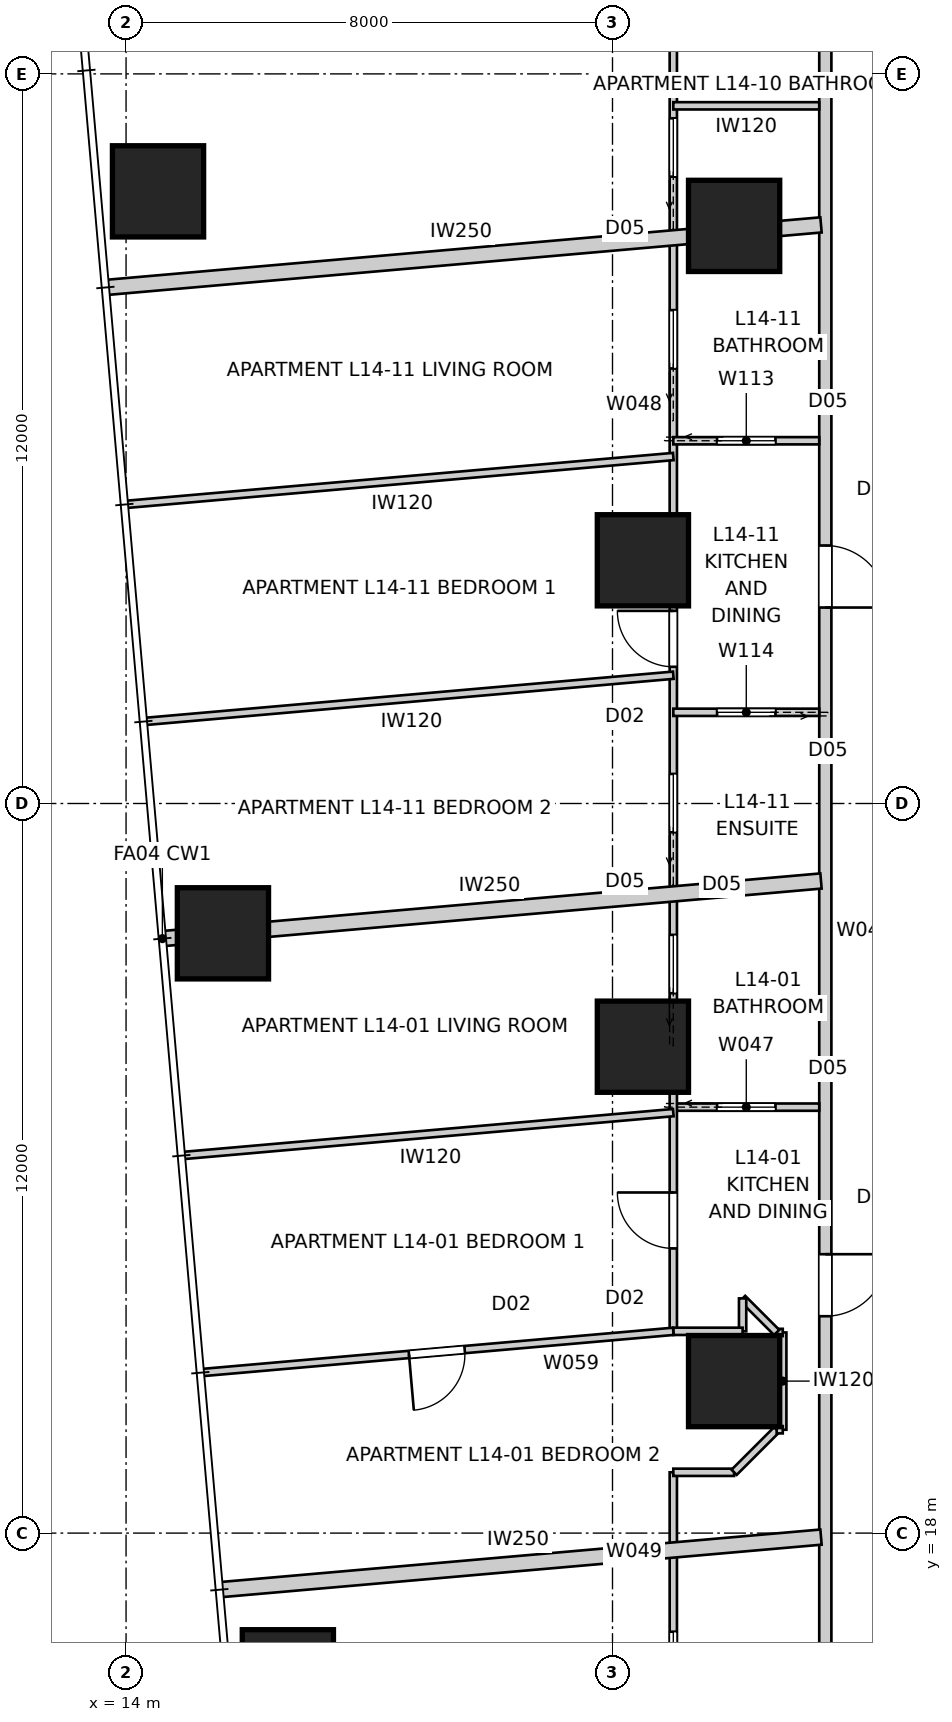
"""IFC4 building model, lengths in metres.
Left out: names, types, materials, properties, quantities, classifications, styles, units other than length and angle.
Written with IfcOpenShell. Run it as: python <this file> out.ifc"""

import sys

from ifc_helpers import new_model, si_unit, direction, frame, frame_2d, origin, origin_2d, place, context, subcontext, project, spatial, rectangle, extrude, element, fill, save


model = new_model("IFC4")
c1 = context("Model", 3, precision=1e-05, world=origin(), true_north=direction((0.0, 1.0)))
c2 = subcontext(c1, "Body", "Model", "MODEL_VIEW")
j1 = project(units=[si_unit("LENGTHUNIT", "METRE"), si_unit("PLANEANGLEUNIT", "RADIAN")], contexts=[c1])
p1 = place(None, origin())
s1 = spatial("IfcSite", under=j1, at=p1, CompositionType="ELEMENT")
p2 = place(p1, origin())
s2 = spatial("IfcBuilding", under=s1, at=p2, CompositionType="ELEMENT")
p3 = place(p2, frame((0.0, 0.0, 54.0)))
s3 = spatial("IfcBuildingStorey", under=s2, at=p3, CompositionType="ELEMENT", Elevation=54.0)
for number, where, z_axis, x_axis in (
    (1, (14.526, 40.068, 0.0), (0.0, 0.0, 1.0), (1.0, 0.0, 0.0)),
    (2, (15.593, 27.865, 0.0), (0.0, 0.0, 1.0), (1.0, 0.0, 0.0)),
    (3, (16.661, 15.661, 0.0), (0.0, 0.0, 1.0), (1.0, 0.0, 0.0)),
    (4, (24.0, 39.5, 0.0), (0.0, 0.0, 1.0), (1.0, 0.0, 0.0)),
    (5, (22.5, 34.0, 0.0), (0.0, 0.0, 1.0), (1.0, 0.0, 0.0)),
    (6, (22.5, 26.0, 0.0), (0.0, 0.0, 1.0), (1.0, 0.0, 0.0)),
    (7, (24.0, 20.5, 0.0), (0.0, 0.0, 1.0), (1.0, 0.0, 0.0)),
):
    element("IfcColumn", number, at=place(p3, frame(where, z_axis=z_axis, x_axis=x_axis)), inside=s3, PredefinedType="COLUMN", context=c2, shape_type="SweptSolid", body=[
        extrude(rectangle(XDim=1.5, YDim=1.5, at=origin_2d()), origin(), (0.0, 0.0, 1.0), 3.4),
    ])
p4 = place(p3, frame((25.5, 43.7, 0.0), z_axis=(0.0, 0.0, 1.0), x_axis=(0.0, -1.0, 0.0)))
e8 = element("IfcWall", 8, at=p4, inside=s3, PredefinedType="PARTITIONING", context=c2, shape_type="SweptSolid", body=[
    extrude(rectangle(XDim=28.2, YDim=0.2, at=frame_2d((14.1, 0.0))), origin(), (0.0, 0.0, 1.0), 3.25),
])
p5 = place(p4, frame((21.113, 0.0, 0.0)))
e9 = element("IfcOpeningElement", 9, at=p5, cuts=e8, PredefinedType="OPENING", context=c2, shape_type="SweptSolid", body=[
    extrude(rectangle(XDim=1.02, YDim=2.34, at=frame_2d((0.51, 1.17))), frame((0.0, 0.11, 0.0), z_axis=(0.0, -1.0, 0.0), x_axis=(1.0, 0.0, 0.0)), (0.0, 0.0, 1.0), 0.22),
])
p6 = place(p4, frame((9.457, 0.0, 0.0)))
e10 = element("IfcOpeningElement", 10, at=p6, cuts=e8, PredefinedType="OPENING", context=c2, shape_type="SweptSolid", body=[
    extrude(rectangle(XDim=1.02, YDim=2.34, at=frame_2d((0.51, 1.17))), frame((0.0, 0.11, 0.0), z_axis=(0.0, -1.0, 0.0), x_axis=(1.0, 0.0, 0.0)), (0.0, 0.0, 1.0), 0.22),
])
p7 = place(p3, frame((13.66, 38.487, 0.0), z_axis=(0.0, 0.0, 1.0), x_axis=(0.996193605338, 0.087168232078, 0.0)))
e11 = element("IfcWall", 11, at=p7, inside=s3, PredefinedType="PARTITIONING", context=c2, shape_type="SweptSolid", body=[
    extrude(rectangle(XDim=11.814, YDim=0.25, at=frame_2d((5.907, 0.0))), origin(), (0.0, 0.0, 1.0), 3.25),
])
p8 = place(p3, frame((15.534, 17.068, 0.0), z_axis=(0.0, 0.0, 1.0), x_axis=(0.996194517831, 0.087157803114, 0.0)))
e12 = element("IfcWall", 12, at=p8, inside=s3, PredefinedType="PARTITIONING", context=c2, shape_type="SweptSolid", body=[
    extrude(rectangle(XDim=9.933, YDim=0.25, at=frame_2d((4.966, 0.0))), origin(), (0.0, 0.0, 1.0), 3.25),
])
p9 = place(p3, frame((14.597, 27.778, 0.0), z_axis=(0.0, 0.0, 1.0), x_axis=(0.996196056792, 0.087140211333, 0.0)))
e13 = element("IfcWall", 13, at=p9, inside=s3, PredefinedType="PARTITIONING", context=c2, shape_type="SweptSolid", body=[
    extrude(rectangle(XDim=10.873, YDim=0.25, at=frame_2d((5.437, 0.0))), origin(), (0.0, 0.0, 1.0), 3.25),
])
p10 = place(p3, frame((23.0, 25.006, 0.0), z_axis=(0.0, 0.0, 1.0), x_axis=(1.0, 0.0, 0.0)))
e14 = element("IfcWall", 14, at=p10, inside=s3, PredefinedType="PARTITIONING", context=c2, shape_type="SweptSolid", body=[
    extrude(rectangle(XDim=2.4, YDim=0.12, at=frame_2d((1.2, 0.0))), origin(), (0.0, 0.0, 1.0), 3.25),
])
p11 = place(p10, frame((0.72, 0.0, 0.0)))
e15 = element("IfcOpeningElement", 15, at=p11, cuts=e14, PredefinedType="OPENING", context=c2, shape_type="SweptSolid", body=[
    extrude(rectangle(XDim=0.96, YDim=2.1, at=frame_2d((0.48, 1.05))), frame((0.0, 0.07, 0.0), z_axis=(0.0, -1.0, 0.0), x_axis=(1.0, 0.0, 0.0)), (0.0, 0.0, 1.0), 0.14),
])
p12 = place(p3, frame((23.0, 21.319, 0.0), z_axis=(0.0, 0.0, 1.0), x_axis=(0.0, 1.0, 0.0)))
e16 = element("IfcWall", 16, at=p12, inside=s3, PredefinedType="PARTITIONING", context=c2, shape_type="SweptSolid", body=[
    extrude(rectangle(XDim=25.681, YDim=0.12, at=frame_2d((12.841, 0.0))), origin(), (0.0, 0.0, 1.0), 2.55),
])
p13 = place(p12, frame((1.364, 0.0, 0.0)))
e17 = element("IfcOpeningElement", 17, at=p13, cuts=e16, PredefinedType="OPENING", context=c2, shape_type="SweptSolid", body=[
    extrude(rectangle(XDim=0.92, YDim=2.34, at=frame_2d((0.46, 1.17))), frame((0.0, 0.07, 0.0), z_axis=(0.0, -1.0, 0.0), x_axis=(1.0, 0.0, 0.0)), (0.0, 0.0, 1.0), 0.14),
])
p14 = place(p12, frame((10.93, 0.0, 0.0)))
e18 = element("IfcOpeningElement", 18, at=p14, cuts=e16, PredefinedType="OPENING", context=c2, shape_type="SweptSolid", body=[
    extrude(rectangle(XDim=0.92, YDim=2.34, at=frame_2d((0.46, 1.17))), frame((0.0, 0.07, 0.0), z_axis=(0.0, -1.0, 0.0), x_axis=(1.0, 0.0, 0.0)), (0.0, 0.0, 1.0), 0.14),
])
p15 = place(p12, frame((22.233, 0.0, 0.0)))
e19 = element("IfcOpeningElement", 19, at=p15, cuts=e16, PredefinedType="OPENING", context=c2, shape_type="SweptSolid", body=[
    extrude(rectangle(XDim=0.92, YDim=2.34, at=frame_2d((0.46, 1.17))), frame((0.0, 0.07, 0.0), z_axis=(0.0, -1.0, 0.0), x_axis=(1.0, 0.0, 0.0)), (0.0, 0.0, 1.0), 0.14),
])
p16 = place(p12, frame((18.991, 0.0, 0.0)))
e20 = element("IfcOpeningElement", 20, at=p16, cuts=e16, PredefinedType="OPENING", context=c2, shape_type="SweptSolid", body=[
    extrude(rectangle(XDim=0.96, YDim=2.1, at=frame_2d((0.48, 1.05))), frame((0.0, 0.07, 0.0), z_axis=(0.0, -1.0, 0.0), x_axis=(1.0, 0.0, 0.0)), (0.0, 0.0, 1.0), 0.14),
])
p17 = place(p12, frame((5.561, 0.0, 0.0)))
e21 = element("IfcOpeningElement", 21, at=p17, cuts=e16, PredefinedType="OPENING", context=c2, shape_type="SweptSolid", body=[
    extrude(rectangle(XDim=0.96, YDim=2.1, at=frame_2d((0.48, 1.05))), frame((0.0, 0.07, 0.0), z_axis=(0.0, -1.0, 0.0), x_axis=(1.0, 0.0, 0.0)), (0.0, 0.0, 1.0), 0.14),
])
p18 = place(p12, frame((15.836, 0.0, 0.0)))
e22 = element("IfcOpeningElement", 22, at=p18, cuts=e16, PredefinedType="OPENING", context=c2, shape_type="SweptSolid", body=[
    extrude(rectangle(XDim=0.96, YDim=2.1, at=frame_2d((0.48, 1.05))), frame((0.0, 0.07, 0.0), z_axis=(0.0, -1.0, 0.0), x_axis=(1.0, 0.0, 0.0)), (0.0, 0.0, 1.0), 0.14),
])
p19 = place(p12, frame((8.208, 0.0, 0.0)))
e23 = element("IfcOpeningElement", 23, at=p19, cuts=e16, PredefinedType="OPENING", context=c2, shape_type="SweptSolid", body=[
    extrude(rectangle(XDim=0.96, YDim=2.1, at=frame_2d((0.48, 1.05))), frame((0.0, 0.07, 0.0), z_axis=(0.0, -1.0, 0.0), x_axis=(1.0, 0.0, 0.0)), (0.0, 0.0, 1.0), 0.14),
])
p20 = place(p3, frame((23.0, 13.0, 0.0), z_axis=(0.0, 0.0, 1.0), x_axis=(0.0, 1.0, 0.0)))
e24 = element("IfcWall", 24, at=p20, inside=s3, PredefinedType="PARTITIONING", context=c2, shape_type="SweptSolid", body=[
    extrude(rectangle(XDim=6.0, YDim=0.12, at=frame_2d((3.0, 0.0))), origin(), (0.0, 0.0, 1.0), 3.25),
])
p21 = place(p20, frame((2.418, 0.0, 0.0)))
e25 = element("IfcOpeningElement", 25, at=p21, cuts=e24, PredefinedType="OPENING", context=c2, shape_type="SweptSolid", body=[
    extrude(rectangle(XDim=0.96, YDim=2.1, at=frame_2d((0.48, 1.05))), frame((0.0, 0.07, 0.0), z_axis=(0.0, -1.0, 0.0), x_axis=(1.0, 0.0, 0.0)), (0.0, 0.0, 1.0), 0.14),
])
p22 = place(p3, frame((23.0, 19.0, 0.0), z_axis=(0.0, 0.0, 1.0), x_axis=(1.0, 0.0, 0.0)))
e26 = element("IfcWall", 26, at=p22, inside=s3, PredefinedType="PARTITIONING", context=c2, shape_type="SweptSolid", body=[
    extrude(rectangle(XDim=1.0, YDim=0.12, at=frame_2d((0.5, 0.0))), origin(), (0.0, 0.0, 1.0), 3.25),
])
p23 = place(p3, frame((24.0, 19.0, 0.0), z_axis=(0.0, 0.0, 1.0), x_axis=(0.707106781187, 0.707106781187, 0.0)))
e27 = element("IfcWall", 27, at=p23, inside=s3, PredefinedType="PARTITIONING", context=c2, shape_type="SweptSolid", body=[
    extrude(rectangle(XDim=0.99, YDim=0.12, at=frame_2d((0.495, 0.0))), origin(), (0.0, 0.0, 1.0), 3.25),
])
p24 = place(p3, frame((24.8, 19.7, 0.0), z_axis=(0.0, 0.0, 1.0), x_axis=(0.0, 1.0, 0.0)))
e28 = element("IfcWall", 28, at=p24, inside=s3, PredefinedType="PARTITIONING", context=c2, shape_type="SweptSolid", body=[
    extrude(rectangle(XDim=1.6, YDim=0.12, at=frame_2d((0.8, 0.0))), origin(), (0.0, 0.0, 1.0), 3.25),
])
p25 = place(p3, frame((24.7, 21.3, 0.0), z_axis=(0.0, 0.0, 1.0), x_axis=(-0.707106781187, 0.707106781187, 0.0)))
e29 = element("IfcWall", 29, at=p25, inside=s3, PredefinedType="PARTITIONING", context=c2, shape_type="SweptSolid", body=[
    extrude(rectangle(XDim=0.792, YDim=0.12, at=frame_2d((0.396, 0.0))), origin(), (0.0, 0.0, 1.0), 3.25),
])
p26 = place(p3, frame((24.14, 21.86, 0.0), z_axis=(0.0, 0.0, 1.0), x_axis=(0.0, -1.0, 0.0)))
e30 = element("IfcWall", 30, at=p26, inside=s3, PredefinedType="PARTITIONING", context=c2, shape_type="SweptSolid", body=[
    extrude(rectangle(XDim=0.542, YDim=0.12, at=frame_2d((0.271, 0.0))), origin(), (0.0, 0.0, 1.0), 3.25),
])
p27 = place(p3, frame((24.14, 21.319, 0.0), z_axis=(0.0, 0.0, 1.0), x_axis=(-1.0, 0.0, 0.0)))
e31 = element("IfcWall", 31, at=p27, inside=s3, PredefinedType="PARTITIONING", context=c2, shape_type="SweptSolid", body=[
    extrude(rectangle(XDim=1.14, YDim=0.12, at=frame_2d((0.57, 0.0))), origin(), (0.0, 0.0, 1.0), 3.25),
])
p28 = place(p3, frame((23.0, 24.916, 0.0), z_axis=(0.0, 0.0, 1.0), x_axis=(-0.99619214338, -0.087184938313, 0.0)))
e32 = element("IfcWall", 32, at=p28, inside=s3, PredefinedType="PARTITIONING", context=c2, shape_type="SweptSolid", body=[
    extrude(rectangle(XDim=8.082, YDim=0.12, at=frame_2d((4.041, 0.0))), origin(), (0.0, 0.0, 1.0), 3.25),
])
p29 = place(p3, frame((23.0, 21.319, 0.0), z_axis=(0.0, 0.0, 1.0), x_axis=(-0.996195047824, -0.0871517452, 0.0)))
e33 = element("IfcWall", 33, at=p29, inside=s3, PredefinedType="PARTITIONING", context=c2, shape_type="SweptSolid", body=[
    extrude(rectangle(XDim=7.768, YDim=0.12, at=frame_2d((3.884, 0.0))), origin(), (0.0, 0.0, 1.0), 3.25),
])
p30 = place(p29, frame((3.444, 0.0, 0.0)))
e34 = element("IfcOpeningElement", 34, at=p30, cuts=e33, PredefinedType="OPENING", context=c2, shape_type="SweptSolid", body=[
    extrude(rectangle(XDim=0.92, YDim=2.34, at=frame_2d((0.46, 1.17))), frame((0.0, 0.07, 0.0), z_axis=(0.0, -1.0, 0.0), x_axis=(1.0, 0.0, 0.0)), (0.0, 0.0, 1.0), 0.14),
])
p31 = place(p3, frame((25.4, 41.475, 0.0), z_axis=(0.0, 0.0, 1.0), x_axis=(-1.0, 0.0, 0.0)))
e35 = element("IfcWall", 35, at=p31, inside=s3, PredefinedType="PARTITIONING", context=c2, shape_type="SweptSolid", body=[
    extrude(rectangle(XDim=2.4, YDim=0.12, at=frame_2d((1.2, 0.0))), origin(), (0.0, 0.0, 1.0), 3.25),
])
p32 = place(p3, frame((23.0, 35.966, 0.0), z_axis=(0.0, 0.0, 1.0), x_axis=(1.0, 0.0, 0.0)))
e36 = element("IfcWall", 36, at=p32, inside=s3, PredefinedType="PARTITIONING", context=c2, shape_type="SweptSolid", body=[
    extrude(rectangle(XDim=2.4, YDim=0.12, at=frame_2d((1.2, 0.0))), origin(), (0.0, 0.0, 1.0), 3.25),
])
p33 = place(p32, frame((0.72, 0.0, 0.0)))
e37 = element("IfcOpeningElement", 37, at=p33, cuts=e36, PredefinedType="OPENING", context=c2, shape_type="SweptSolid", body=[
    extrude(rectangle(XDim=0.96, YDim=2.1, at=frame_2d((0.48, 1.05))), frame((0.0, 0.07, 0.0), z_axis=(0.0, -1.0, 0.0), x_axis=(1.0, 0.0, 0.0)), (0.0, 0.0, 1.0), 0.14),
])
p34 = place(p3, frame((25.4, 31.5, 0.0), z_axis=(0.0, 0.0, 1.0), x_axis=(-1.0, 0.0, 0.0)))
e38 = element("IfcWall", 38, at=p34, inside=s3, PredefinedType="PARTITIONING", context=c2, shape_type="SweptSolid", body=[
    extrude(rectangle(XDim=2.4, YDim=0.12, at=frame_2d((1.2, 0.0))), origin(), (0.0, 0.0, 1.0), 3.25),
])
p35 = place(p34, frame((0.72, 0.0, 0.0)))
e39 = element("IfcOpeningElement", 39, at=p35, cuts=e38, PredefinedType="OPENING", context=c2, shape_type="SweptSolid", body=[
    extrude(rectangle(XDim=0.96, YDim=2.1, at=frame_2d((0.48, 1.05))), frame((0.0, 0.07, 0.0), z_axis=(0.0, -1.0, 0.0), x_axis=(1.0, 0.0, 0.0)), (0.0, 0.0, 1.0), 0.14),
])
p36 = place(p3, frame((23.0, 35.707, 0.0), z_axis=(0.0, 0.0, 1.0), x_axis=(-0.996194246178, -0.087160907995, 0.0)))
e40 = element("IfcWall", 40, at=p36, inside=s3, PredefinedType="PARTITIONING", context=c2, shape_type="SweptSolid", body=[
    extrude(rectangle(XDim=9.022, YDim=0.12, at=frame_2d((4.511, 0.0))), origin(), (0.0, 0.0, 1.0), 3.25),
])
p37 = place(p3, frame((23.0, 32.11, 0.0), z_axis=(0.0, 0.0, 1.0), x_axis=(-0.996194478193, -0.087158256162, 0.0)))
e41 = element("IfcWall", 41, at=p37, inside=s3, PredefinedType="PARTITIONING", context=c2, shape_type="SweptSolid", body=[
    extrude(rectangle(XDim=8.709, YDim=0.12, at=frame_2d((4.354, 0.0))), origin(), (0.0, 0.0, 1.0), 3.25),
])
for number, where, z_axis, x_axis in (
    (42, (24.8, 19.7, 0.0), (0.0, 0.0, 1.0), (-1.0, 0.0, 0.0)),
    (43, (24.8, 21.3, 0.0), (0.0, 0.0, 1.0), (-1.0, 0.0, 0.0)),
):
    element("IfcWall", number, at=place(p3, frame(where, z_axis=z_axis, x_axis=x_axis)), inside=s3, PredefinedType="PARTITIONING", context=c2, shape_type="SweptSolid", body=[
        extrude(rectangle(XDim=0.1, YDim=0.12, at=frame_2d((0.05, 0.0))), origin(), (0.0, 0.0, 1.0), 3.25),
    ])
p38 = place(p5, origin())
e44 = element("IfcDoor", 44, at=p38, inside=s3, OperationType="SINGLE_SWING_LEFT", PredefinedType="DOOR", context=c2, shape_type="SweptSolid", body=[
    extrude(rectangle(XDim=1.02, YDim=2.34, at=frame_2d((0.51, 1.17))), frame((0.0, 0.025, 0.0), z_axis=(0.0, -1.0, 0.0), x_axis=(1.0, 0.0, 0.0)), (0.0, 0.0, 1.0), 0.05),
])
fill(e9, e44)
p39 = place(p6, origin())
e45 = element("IfcDoor", 45, at=p39, inside=s3, OperationType="SINGLE_SWING_RIGHT", PredefinedType="DOOR", context=c2, shape_type="SweptSolid", body=[
    extrude(rectangle(XDim=1.02, YDim=2.34, at=frame_2d((0.51, 1.17))), frame((0.0, 0.025, 0.0), z_axis=(0.0, -1.0, 0.0), x_axis=(1.0, 0.0, 0.0)), (0.0, 0.0, 1.0), 0.05),
])
fill(e10, e45)
p40 = place(p13, origin())
e46 = element("IfcDoor", 46, at=p40, inside=s3, OperationType="SINGLE_SWING_RIGHT", PredefinedType="DOOR", context=c2, shape_type="SweptSolid", body=[
    extrude(rectangle(XDim=0.92, YDim=2.34, at=frame_2d((0.46, 1.17))), frame((0.0, 0.025, 0.0), z_axis=(0.0, -1.0, 0.0), x_axis=(1.0, 0.0, 0.0)), (0.0, 0.0, 1.0), 0.05),
])
fill(e17, e46)
p41 = place(p11, origin())
e47 = element("IfcDoor", 47, at=p41, inside=s3, OperationType="SLIDING_TO_LEFT", PredefinedType="DOOR", context=c2, shape_type="SweptSolid", body=[
    extrude(rectangle(XDim=0.96, YDim=2.1, at=frame_2d((0.48, 1.05))), frame((0.0, 0.025, 0.0), z_axis=(0.0, -1.0, 0.0), x_axis=(1.0, 0.0, 0.0)), (0.0, 0.0, 1.0), 0.05),
])
fill(e15, e47)
p42 = place(p14, origin())
e48 = element("IfcDoor", 48, at=p42, inside=s3, OperationType="SINGLE_SWING_RIGHT", PredefinedType="DOOR", context=c2, shape_type="SweptSolid", body=[
    extrude(rectangle(XDim=0.92, YDim=2.34, at=frame_2d((0.46, 1.17))), frame((0.0, 0.025, 0.0), z_axis=(0.0, -1.0, 0.0), x_axis=(1.0, 0.0, 0.0)), (0.0, 0.0, 1.0), 0.05),
])
fill(e18, e48)
p43 = place(p33, origin())
e49 = element("IfcDoor", 49, at=p43, inside=s3, OperationType="SLIDING_TO_LEFT", PredefinedType="DOOR", context=c2, shape_type="SweptSolid", body=[
    extrude(rectangle(XDim=0.96, YDim=2.1, at=frame_2d((0.48, 1.05))), frame((0.0, 0.025, 0.0), z_axis=(0.0, -1.0, 0.0), x_axis=(1.0, 0.0, 0.0)), (0.0, 0.0, 1.0), 0.05),
])
fill(e37, e49)
p44 = place(p35, origin())
e50 = element("IfcDoor", 50, at=p44, inside=s3, OperationType="SLIDING_TO_LEFT", PredefinedType="DOOR", context=c2, shape_type="SweptSolid", body=[
    extrude(rectangle(XDim=0.96, YDim=2.1, at=frame_2d((0.48, 1.05))), frame((0.0, 0.025, 0.0), z_axis=(0.0, -1.0, 0.0), x_axis=(1.0, 0.0, 0.0)), (0.0, 0.0, 1.0), 0.05),
])
fill(e39, e50)
p45 = place(p16, origin())
e51 = element("IfcDoor", 51, at=p45, inside=s3, OperationType="SLIDING_TO_LEFT", PredefinedType="DOOR", context=c2, shape_type="SweptSolid", body=[
    extrude(rectangle(XDim=0.96, YDim=2.1, at=frame_2d((0.48, 1.05))), frame((0.0, 0.025, 0.0), z_axis=(0.0, -1.0, 0.0), x_axis=(1.0, 0.0, 0.0)), (0.0, 0.0, 1.0), 0.05),
])
fill(e20, e51)
p46 = place(p17, origin())
e52 = element("IfcDoor", 52, at=p46, inside=s3, OperationType="SLIDING_TO_LEFT", PredefinedType="DOOR", context=c2, shape_type="SweptSolid", body=[
    extrude(rectangle(XDim=0.96, YDim=2.1, at=frame_2d((0.48, 1.05))), frame((0.0, 0.025, 0.0), z_axis=(0.0, -1.0, 0.0), x_axis=(1.0, 0.0, 0.0)), (0.0, 0.0, 1.0), 0.05),
])
fill(e21, e52)
p47 = place(p21, origin())
e53 = element("IfcDoor", 53, at=p47, inside=s3, OperationType="SLIDING_TO_LEFT", PredefinedType="DOOR", context=c2, shape_type="SweptSolid", body=[
    extrude(rectangle(XDim=0.96, YDim=2.1, at=frame_2d((0.48, 1.05))), frame((0.0, 0.025, 0.0), z_axis=(0.0, -1.0, 0.0), x_axis=(1.0, 0.0, 0.0)), (0.0, 0.0, 1.0), 0.05),
])
fill(e25, e53)
p48 = place(p18, origin())
e54 = element("IfcDoor", 54, at=p48, inside=s3, OperationType="SLIDING_TO_LEFT", PredefinedType="DOOR", context=c2, shape_type="SweptSolid", body=[
    extrude(rectangle(XDim=0.96, YDim=2.1, at=frame_2d((0.48, 1.05))), frame((0.0, 0.025, 0.0), z_axis=(0.0, -1.0, 0.0), x_axis=(1.0, 0.0, 0.0)), (0.0, 0.0, 1.0), 0.05),
])
fill(e22, e54)
p49 = place(p19, origin())
e55 = element("IfcDoor", 55, at=p49, inside=s3, OperationType="SLIDING_TO_LEFT", PredefinedType="DOOR", context=c2, shape_type="SweptSolid", body=[
    extrude(rectangle(XDim=0.96, YDim=2.1, at=frame_2d((0.48, 1.05))), frame((0.0, 0.025, 0.0), z_axis=(0.0, -1.0, 0.0), x_axis=(1.0, 0.0, 0.0)), (0.0, 0.0, 1.0), 0.05),
])
fill(e23, e55)
p50 = place(p30, origin())
e56 = element("IfcDoor", 56, at=p50, inside=s3, OperationType="SINGLE_SWING_RIGHT", PredefinedType="DOOR", context=c2, shape_type="SweptSolid", body=[
    extrude(rectangle(XDim=0.92, YDim=2.34, at=frame_2d((0.46, 1.17))), frame((0.0, 0.025, 0.0), z_axis=(0.0, -1.0, 0.0), x_axis=(1.0, 0.0, 0.0)), (0.0, 0.0, 1.0), 0.05),
])
fill(e34, e56)
save(model, sys.argv[1])
